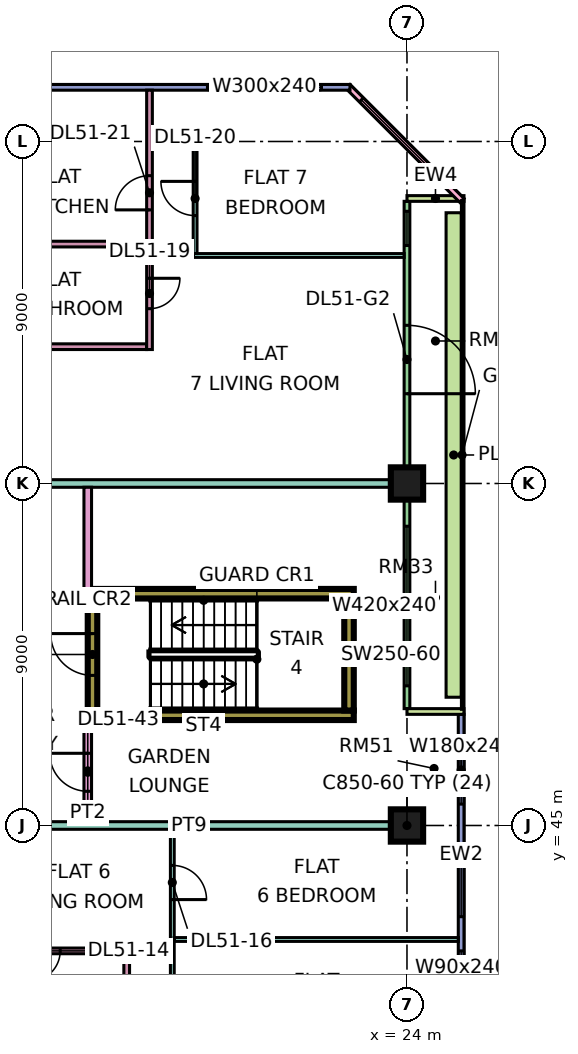
"""IFC4 building model, lengths in metres.
Left out: names, types, materials, properties, quantities, classifications, styles, units other than length and angle.
Written with IfcOpenShell. Run it as: python <this file> out.ifc"""

import sys

from ifc_helpers import new_model, si_unit, direction, frame, frame_2d, origin, origin_2d, place, context, subcontext, project, spatial, rectangle, extrude, element, fill, save


model = new_model("IFC4")
c1 = context("Model", 3, precision=1e-05, world=origin(), true_north=direction((0.0, 1.0)))
c2 = subcontext(c1, "Body", "Model", "MODEL_VIEW")
j1 = project(units=[si_unit("LENGTHUNIT", "METRE"), si_unit("PLANEANGLEUNIT", "RADIAN")], contexts=[c1])
p1 = place(None, origin())
s1 = spatial("IfcSite", under=j1, at=p1, CompositionType="ELEMENT")
p2 = place(p1, origin())
s2 = spatial("IfcBuilding", under=s1, at=p2, CompositionType="ELEMENT")
p3 = place(p2, frame((0.0, 0.0, 219.15)))
s3 = spatial("IfcBuildingStorey", under=s2, at=p3, CompositionType="ELEMENT", Elevation=219.15)
for number, where, z_axis, x_axis in (
    (1, (24.0, 45.0, 0.0), (0.0, 0.0, 1.0), (1.0, 0.0, 0.0)),
    (2, (24.0, 54.0, 0.0), (0.0, 0.0, 1.0), (1.0, 0.0, 0.0)),
):
    element("IfcColumn", number, at=place(p3, frame(where, z_axis=z_axis, x_axis=x_axis)), inside=s3, PredefinedType="COLUMN", context=c2, shape_type="SweptSolid", body=[
        extrude(rectangle(XDim=0.85, YDim=0.85, at=origin_2d()), origin(), (0.0, 0.0, 1.0), 3.75),
    ])
for number, where, z_axis, x_axis in (
    (3, (15.6, 47.9, 0.0), (0.0, 0.0, 1.0), (1.0, 0.0, 0.0)),
    (4, (15.6, 51.1, 0.0), (0.0, 0.0, 1.0), (1.0, 0.0, 0.0)),
):
    element("IfcWall", number, at=place(p3, frame(where, z_axis=z_axis, x_axis=x_axis)), inside=s3, PredefinedType="SHEAR", context=c2, shape_type="SweptSolid", body=[
        extrude(rectangle(XDim=7.0, YDim=0.25, at=frame_2d((3.5, 0.0))), origin(), (0.0, 0.0, 1.0), 3.75),
    ])
p4 = place(p3, frame((15.725, 48.025, 0.0), z_axis=(0.0, 0.0, 1.0), x_axis=(0.0, 1.0, 0.0)))
e5 = element("IfcWall", 5, at=p4, inside=s3, PredefinedType="SHEAR", context=c2, shape_type="SweptSolid", body=[
    extrude(rectangle(XDim=2.95, YDim=0.25, at=frame_2d((1.475, 0.0))), origin(), (0.0, 0.0, 1.0), 3.75),
])
p5 = place(p4, frame((0.925, 0.0, 0.0)))
e6 = element("IfcOpeningElement", 6, at=p5, cuts=e5, PredefinedType="OPENING", context=c2, shape_type="SweptSolid", body=[
    extrude(rectangle(XDim=1.1, YDim=2.2, at=frame_2d((0.55, 1.1))), frame((0.0, 0.135, 0.0), z_axis=(0.0, -1.0, 0.0), x_axis=(1.0, 0.0, 0.0)), (0.0, 0.0, 1.0), 0.27),
])
p6 = place(p3, frame((22.475, 48.025, 0.0), z_axis=(0.0, 0.0, 1.0), x_axis=(0.0, 1.0, 0.0)))
e7 = element("IfcWall", 7, at=p6, inside=s3, PredefinedType="SHEAR", context=c2, shape_type="SweptSolid", body=[
    extrude(rectangle(XDim=2.95, YDim=0.25, at=frame_2d((1.475, 0.0))), origin(), (0.0, 0.0, 1.0), 3.75),
])
p7 = place(p3, frame((25.425, 40.5, 0.0), z_axis=(0.0, 0.0, 1.0), x_axis=(0.0, 1.0, 0.0)))
e8 = element("IfcWall", 8, at=p7, inside=s3, PredefinedType="SOLIDWALL", context=c2, shape_type="SweptSolid", body=[
    extrude(rectangle(XDim=7.425, YDim=0.15, at=frame_2d((3.712, 0.0))), origin(), (0.0, 0.0, 1.0), 3.35),
])
p8 = place(p7, frame((0.3, 0.0, 0.45)))
e9 = element("IfcOpeningElement", 9, at=p8, cuts=e8, PredefinedType="OPENING", context=c2, shape_type="SweptSolid", body=[
    extrude(rectangle(XDim=0.9, YDim=2.4, at=frame_2d((0.45, 1.2))), frame((0.0, 0.085, 0.0), z_axis=(0.0, -1.0, 0.0), x_axis=(1.0, 0.0, 0.0)), (0.0, 0.0, 1.0), 0.17),
])
p9 = place(p7, frame((2.1, 0.0, 0.45)))
e10 = element("IfcOpeningElement", 10, at=p9, cuts=e8, PredefinedType="OPENING", context=c2, shape_type="SweptSolid", body=[
    extrude(rectangle(XDim=1.8, YDim=2.4, at=frame_2d((0.9, 1.2))), frame((0.0, 0.085, 0.0), z_axis=(0.0, -1.0, 0.0), x_axis=(1.0, 0.0, 0.0)), (0.0, 0.0, 1.0), 0.17),
])
p10 = place(p7, frame((5.062, 0.0, 0.45)))
e11 = element("IfcOpeningElement", 11, at=p10, cuts=e8, PredefinedType="OPENING", context=c2, shape_type="SweptSolid", body=[
    extrude(rectangle(XDim=1.8, YDim=2.4, at=frame_2d((0.9, 1.2))), frame((0.0, 0.085, 0.0), z_axis=(0.0, -1.0, 0.0), x_axis=(1.0, 0.0, 0.0)), (0.0, 0.0, 1.0), 0.17),
])
p11 = place(p3, frame((24.0, 48.075, 0.0), z_axis=(0.0, 0.0, 1.0), x_axis=(0.0, 1.0, 0.0)))
e12 = element("IfcWall", 12, at=p11, inside=s3, PredefinedType="SOLIDWALL", context=c2, shape_type="SweptSolid", body=[
    extrude(rectangle(XDim=13.35, YDim=0.15, at=frame_2d((6.675, 0.0))), origin(), (0.0, 0.0, 1.0), 3.35),
])
p12 = place(p11, frame((0.6, 0.0, 0.45)))
e13 = element("IfcOpeningElement", 13, at=p12, cuts=e12, PredefinedType="OPENING", context=c2, shape_type="SweptSolid", body=[
    extrude(rectangle(XDim=4.2, YDim=2.4, at=frame_2d((2.1, 1.2))), frame((0.0, 0.085, 0.0), z_axis=(0.0, -1.0, 0.0), x_axis=(1.0, 0.0, 0.0)), (0.0, 0.0, 1.0), 0.17),
])
p13 = place(p11, frame((8.288, 0.0, 0.0)))
e14 = element("IfcOpeningElement", 14, at=p13, cuts=e12, PredefinedType="OPENING", context=c2, shape_type="SweptSolid", body=[
    extrude(rectangle(XDim=1.8, YDim=2.4, at=frame_2d((0.9, 1.2))), frame((0.0, 0.085, 0.0), z_axis=(0.0, -1.0, 0.0), x_axis=(1.0, 0.0, 0.0)), (0.0, 0.0, 1.0), 0.17),
])
p14 = place(p11, frame((12.188, 0.0, 0.45)))
e15 = element("IfcOpeningElement", 15, at=p14, cuts=e12, PredefinedType="OPENING", context=c2, shape_type="SweptSolid", body=[
    extrude(rectangle(XDim=0.9, YDim=2.4, at=frame_2d((0.45, 1.2))), frame((0.0, 0.085, 0.0), z_axis=(0.0, -1.0, 0.0), x_axis=(1.0, 0.0, 0.0)), (0.0, 0.0, 1.0), 0.17),
])
for number, where, z_axis, x_axis in (
    (16, (25.5, 48.0, 0.0), (0.0, 0.0, 1.0), (-1.0, 0.0, 0.0)),
    (17, (25.5, 61.5, 0.0), (0.0, 0.0, 1.0), (-1.0, 0.0, 0.0)),
):
    element("IfcWall", number, at=place(p3, frame(where, z_axis=z_axis, x_axis=x_axis)), inside=s3, PredefinedType="SOLIDWALL", context=c2, shape_type="SweptSolid", body=[
        extrude(rectangle(XDim=1.5, YDim=0.15, at=frame_2d((0.75, 0.0))), origin(), (0.0, 0.0, 1.0), 3.35),
    ])
p15 = place(p3, frame((25.447, 61.447, 0.0), z_axis=(0.0, 0.0, 1.0), x_axis=(-0.707106781187, 0.707106781187, 0.0)))
e18 = element("IfcWall", 18, at=p15, inside=s3, PredefinedType="SOLIDWALL", context=c2, shape_type="SweptSolid", body=[
    extrude(rectangle(XDim=4.243, YDim=0.15, at=frame_2d((2.121, 0.0))), origin(), (0.0, 0.0, 1.0), 3.35),
])
p16 = place(p15, frame((0.744, 0.0, 0.45)))
e19 = element("IfcOpeningElement", 19, at=p16, cuts=e18, PredefinedType="OPENING", context=c2, shape_type="SweptSolid", body=[
    extrude(rectangle(XDim=3.0, YDim=2.4, at=frame_2d((1.5, 1.2))), frame((0.0, 0.085, 0.0), z_axis=(0.0, -1.0, 0.0), x_axis=(1.0, 0.0, 0.0)), (0.0, 0.0, 1.0), 0.17),
])
p17 = place(p3, frame((22.5, 64.425, 0.0), z_axis=(0.0, 0.0, 1.0), x_axis=(-1.0, 0.0, 0.0)))
e20 = element("IfcWall", 20, at=p17, inside=s3, PredefinedType="SOLIDWALL", context=c2, shape_type="SweptSolid", body=[
    extrude(rectangle(XDim=10.425, YDim=0.15, at=frame_2d((5.212, 0.0))), origin(), (0.0, 0.0, 1.0), 3.35),
])
p18 = place(p17, frame((0.75, 0.0, 0.45)))
e21 = element("IfcOpeningElement", 21, at=p18, cuts=e20, PredefinedType="OPENING", context=c2, shape_type="SweptSolid", body=[
    extrude(rectangle(XDim=3.0, YDim=2.4, at=frame_2d((1.5, 1.2))), frame((0.0, 0.085, 0.0), z_axis=(0.0, -1.0, 0.0), x_axis=(1.0, 0.0, 0.0)), (0.0, 0.0, 1.0), 0.17),
])
p19 = place(p3, frame((25.229, 48.375, 0.0), z_axis=(0.0, 0.0, 1.0), x_axis=(0.0, 1.0, 0.0)))
e22 = element("IfcWall", 22, at=p19, inside=s3, PredefinedType="SOLIDWALL", context=c2, shape_type="SweptSolid", body=[
    extrude(rectangle(XDim=12.75, YDim=0.4, at=frame_2d((6.375, 0.0))), origin(), (0.0, 0.0, 1.0), 0.7),
])
p20 = place(p3, frame((12.525, 41.7, 0.0), z_axis=(0.0, 0.0, 1.0), x_axis=(1.0, 0.0, 0.0)))
e23 = element("IfcWall", 23, at=p20, inside=s3, PredefinedType="PARTITIONING", context=c2, shape_type="SweptSolid", body=[
    extrude(rectangle(XDim=4.025, YDim=0.15, at=frame_2d((2.013, 0.0))), origin(), (0.0, 0.0, 1.0), 3.35),
])
p21 = place(p20, frame((1.55, 0.0, 0.0)))
e24 = element("IfcOpeningElement", 24, at=p21, cuts=e23, PredefinedType="OPENING", context=c2, shape_type="SweptSolid", body=[
    extrude(rectangle(XDim=0.8, YDim=2.1, at=frame_2d((0.4, 1.05))), frame((0.0, 0.085, 0.0), z_axis=(0.0, -1.0, 0.0), x_axis=(1.0, 0.0, 0.0)), (0.0, 0.0, 1.0), 0.17),
])
p22 = place(p3, frame((12.525, 45.0, 0.0), z_axis=(0.0, 0.0, 1.0), x_axis=(1.0, 0.0, 0.0)))
e25 = element("IfcWall", 25, at=p22, inside=s3, PredefinedType="PARTITIONING", context=c2, shape_type="SweptSolid", body=[
    extrude(rectangle(XDim=11.475, YDim=0.2, at=frame_2d((5.738, 0.0))), origin(), (0.0, 0.0, 1.0), 3.35),
])
p23 = place(p3, frame((12.525, 54.0, 0.0), z_axis=(0.0, 0.0, 1.0), x_axis=(1.0, 0.0, 0.0)))
e26 = element("IfcWall", 26, at=p23, inside=s3, PredefinedType="PARTITIONING", context=c2, shape_type="SweptSolid", body=[
    extrude(rectangle(XDim=11.401, YDim=0.2, at=frame_2d((5.701, 0.0))), origin(), (0.0, 0.0, 1.0), 3.35),
])
for number, where, z_axis, x_axis in (
    (27, (12.525, 57.6, 0.0), (0.0, 0.0, 1.0), (1.0, 0.0, 0.0)),
    (28, (12.525, 60.3, 0.0), (0.0, 0.0, 1.0), (1.0, 0.0, 0.0)),
):
    element("IfcWall", number, at=place(p3, frame(where, z_axis=z_axis, x_axis=x_axis)), inside=s3, PredefinedType="PARTITIONING", context=c2, shape_type="SweptSolid", body=[
        extrude(rectangle(XDim=4.625, YDim=0.15, at=frame_2d((2.312, 0.0))), origin(), (0.0, 0.0, 1.0), 3.35),
    ])
p24 = place(p3, frame((15.6, 45.1, 0.0), z_axis=(0.0, 0.0, 1.0), x_axis=(0.0, 1.0, 0.0)))
e29 = element("IfcWall", 29, at=p24, inside=s3, PredefinedType="PARTITIONING", context=c2, shape_type="SweptSolid", body=[
    extrude(rectangle(XDim=2.675, YDim=0.2, at=frame_2d((1.337, 0.0))), origin(), (0.0, 0.0, 1.0), 3.35),
])
p25 = place(p24, frame((0.8, 0.0, 0.0)))
e30 = element("IfcOpeningElement", 30, at=p25, cuts=e29, PredefinedType="OPENING", context=c2, shape_type="SweptSolid", body=[
    extrude(rectangle(XDim=1.0, YDim=2.1, at=frame_2d((0.5, 1.05))), frame((0.0, 0.11, 0.0), z_axis=(0.0, -1.0, 0.0), x_axis=(1.0, 0.0, 0.0)), (0.0, 0.0, 1.0), 0.22),
])
p26 = place(p3, frame((15.6, 51.225, 0.0), z_axis=(0.0, 0.0, 1.0), x_axis=(0.0, 1.0, 0.0)))
e31 = element("IfcWall", 31, at=p26, inside=s3, PredefinedType="PARTITIONING", context=c2, shape_type="SweptSolid", body=[
    extrude(rectangle(XDim=2.675, YDim=0.2, at=frame_2d((1.337, 0.0))), origin(), (0.0, 0.0, 1.0), 3.35),
])
p27 = place(p3, frame((16.625, 36.1, 0.0), z_axis=(0.0, 0.0, 1.0), x_axis=(0.0, 1.0, 0.0)))
e32 = element("IfcWall", 32, at=p27, inside=s3, PredefinedType="PARTITIONING", context=c2, shape_type="SweptSolid", body=[
    extrude(rectangle(XDim=5.675, YDim=0.15, at=frame_2d((2.837, 0.0))), origin(), (0.0, 0.0, 1.0), 3.35),
])
p28 = place(p27, frame((0.8, 0.0, 0.0)))
e33 = element("IfcOpeningElement", 33, at=p28, cuts=e32, PredefinedType="OPENING", context=c2, shape_type="SweptSolid", body=[
    extrude(rectangle(XDim=0.9, YDim=2.1, at=frame_2d((0.45, 1.05))), frame((0.0, 0.085, 0.0), z_axis=(0.0, -1.0, 0.0), x_axis=(1.0, 0.0, 0.0)), (0.0, 0.0, 1.0), 0.17),
])
p29 = place(p3, frame((17.225, 57.525, 0.0), z_axis=(0.0, 0.0, 1.0), x_axis=(0.0, 1.0, 0.0)))
e34 = element("IfcWall", 34, at=p29, inside=s3, PredefinedType="PARTITIONING", context=c2, shape_type="SweptSolid", body=[
    extrude(rectangle(XDim=6.825, YDim=0.15, at=frame_2d((3.413, 0.0))), origin(), (0.0, 0.0, 1.0), 3.35),
])
p30 = place(p29, frame((1.075, 0.0, 0.0)))
e35 = element("IfcOpeningElement", 35, at=p30, cuts=e34, PredefinedType="OPENING", context=c2, shape_type="SweptSolid", body=[
    extrude(rectangle(XDim=0.8, YDim=2.1, at=frame_2d((0.4, 1.05))), frame((0.0, 0.085, 0.0), z_axis=(0.0, -1.0, 0.0), x_axis=(1.0, 0.0, 0.0)), (0.0, 0.0, 1.0), 0.17),
])
p31 = place(p29, frame((3.675, 0.0, 0.0)))
e36 = element("IfcOpeningElement", 36, at=p31, cuts=e34, PredefinedType="OPENING", context=c2, shape_type="SweptSolid", body=[
    extrude(rectangle(XDim=0.9, YDim=2.1, at=frame_2d((0.45, 1.05))), frame((0.0, 0.085, 0.0), z_axis=(0.0, -1.0, 0.0), x_axis=(1.0, 0.0, 0.0)), (0.0, 0.0, 1.0), 0.17),
])
p32 = place(p3, frame((17.825, 39.05, 0.0), z_axis=(0.0, 0.0, 1.0), x_axis=(0.0, 1.0, 0.0)))
e37 = element("IfcWall", 37, at=p32, inside=s3, PredefinedType="PARTITIONING", context=c2, shape_type="SweptSolid", body=[
    extrude(rectangle(XDim=5.85, YDim=0.1, at=frame_2d((2.925, 0.0))), origin(), (0.0, 0.0, 1.0), 3.35),
])
p33 = place(p32, frame((1.0, 0.0, 0.0)))
e38 = element("IfcOpeningElement", 38, at=p33, cuts=e37, PredefinedType="OPENING", context=c2, shape_type="SweptSolid", body=[
    extrude(rectangle(XDim=0.9, YDim=2.1, at=frame_2d((0.45, 1.05))), frame((0.0, 0.06, 0.0), z_axis=(0.0, -1.0, 0.0), x_axis=(1.0, 0.0, 0.0)), (0.0, 0.0, 1.0), 0.12),
])
p34 = place(p32, frame((4.0, 0.0, 0.0)))
e39 = element("IfcOpeningElement", 39, at=p34, cuts=e37, PredefinedType="OPENING", context=c2, shape_type="SweptSolid", body=[
    extrude(rectangle(XDim=0.9, YDim=2.1, at=frame_2d((0.45, 1.05))), frame((0.0, 0.06, 0.0), z_axis=(0.0, -1.0, 0.0), x_axis=(1.0, 0.0, 0.0)), (0.0, 0.0, 1.0), 0.12),
])
p35 = place(p3, frame((17.875, 42.0, 0.0), z_axis=(0.0, 0.0, 1.0), x_axis=(1.0, 0.0, 0.0)))
e40 = element("IfcWall", 40, at=p35, inside=s3, PredefinedType="PARTITIONING", context=c2, shape_type="SweptSolid", body=[
    extrude(rectangle(XDim=7.476, YDim=0.1, at=frame_2d((3.738, 0.0))), origin(), (0.0, 0.0, 1.0), 3.35),
])
p36 = place(p3, frame((18.0, 63.0, 0.0), z_axis=(0.0, 0.0, 1.0), x_axis=(1.0, 0.0, 0.0)))
e41 = element("IfcWall", 41, at=p36, inside=s3, PredefinedType="PARTITIONING", context=c2, shape_type="SweptSolid", body=[
    extrude(rectangle(XDim=0.375, YDim=0.1, at=frame_2d((0.188, 0.0))), origin(), (0.0, 0.0, 1.0), 3.35),
])
p37 = place(p3, frame((18.375, 60.0, 0.0), z_axis=(0.0, 0.0, 1.0), x_axis=(1.0, 0.0, 0.0)))
e42 = element("IfcWall", 42, at=p37, inside=s3, PredefinedType="PARTITIONING", context=c2, shape_type="SweptSolid", body=[
    extrude(rectangle(XDim=5.551, YDim=0.1, at=frame_2d((2.775, 0.0))), origin(), (0.0, 0.0, 1.0), 3.35),
])
p38 = place(p3, frame((18.425, 60.05, 0.0), z_axis=(0.0, 0.0, 1.0), x_axis=(0.0, 1.0, 0.0)))
e43 = element("IfcWall", 43, at=p38, inside=s3, PredefinedType="PARTITIONING", context=c2, shape_type="SweptSolid", body=[
    extrude(rectangle(XDim=3.0, YDim=0.1, at=frame_2d((1.5, 0.0))), origin(), (0.0, 0.0, 1.0), 3.35),
])
p39 = place(p38, frame((1.0, 0.0, 0.0)))
e44 = element("IfcOpeningElement", 44, at=p39, cuts=e43, PredefinedType="OPENING", context=c2, shape_type="SweptSolid", body=[
    extrude(rectangle(XDim=0.9, YDim=2.1, at=frame_2d((0.45, 1.05))), frame((0.0, 0.06, 0.0), z_axis=(0.0, -1.0, 0.0), x_axis=(1.0, 0.0, 0.0)), (0.0, 0.0, 1.0), 0.12),
])
p40 = place(p8, origin())
e45 = element("IfcWindow", 45, at=p40, inside=s3, PartitioningType="SINGLE_PANEL", PredefinedType="WINDOW", context=c2, shape_type="SweptSolid", body=[
    extrude(rectangle(XDim=0.9, YDim=2.4, at=frame_2d((0.45, 1.2))), frame((0.0, 0.03, 0.0), z_axis=(0.0, -1.0, 0.0), x_axis=(1.0, 0.0, 0.0)), (0.0, 0.0, 1.0), 0.06),
])
fill(e9, e45)
p41 = place(p9, origin())
e46 = element("IfcWindow", 46, at=p41, inside=s3, PartitioningType="SINGLE_PANEL", PredefinedType="WINDOW", context=c2, shape_type="SweptSolid", body=[
    extrude(rectangle(XDim=1.8, YDim=2.4, at=frame_2d((0.9, 1.2))), frame((0.0, 0.03, 0.0), z_axis=(0.0, -1.0, 0.0), x_axis=(1.0, 0.0, 0.0)), (0.0, 0.0, 1.0), 0.06),
])
fill(e10, e46)
p42 = place(p10, origin())
e47 = element("IfcWindow", 47, at=p42, inside=s3, PartitioningType="SINGLE_PANEL", PredefinedType="WINDOW", context=c2, shape_type="SweptSolid", body=[
    extrude(rectangle(XDim=1.8, YDim=2.4, at=frame_2d((0.9, 1.2))), frame((0.0, 0.03, 0.0), z_axis=(0.0, -1.0, 0.0), x_axis=(1.0, 0.0, 0.0)), (0.0, 0.0, 1.0), 0.06),
])
fill(e11, e47)
p43 = place(p12, origin())
e48 = element("IfcWindow", 48, at=p43, inside=s3, PartitioningType="SINGLE_PANEL", PredefinedType="WINDOW", context=c2, shape_type="SweptSolid", body=[
    extrude(rectangle(XDim=4.2, YDim=2.4, at=frame_2d((2.1, 1.2))), frame((0.0, 0.03, 0.0), z_axis=(0.0, -1.0, 0.0), x_axis=(1.0, 0.0, 0.0)), (0.0, 0.0, 1.0), 0.06),
])
fill(e13, e48)
p44 = place(p13, frame((1.8, 0.0, 0.0), z_axis=(0.0, 0.0, 1.0), x_axis=(-1.0, 0.0, 0.0)))
e49 = element("IfcDoor", 49, at=p44, inside=s3, OperationType="DOUBLE_DOOR_SINGLE_SWING", PredefinedType="DOOR", context=c2, shape_type="SweptSolid", body=[
    extrude(rectangle(XDim=1.8, YDim=2.4, at=frame_2d((0.9, 1.2))), frame((0.0, 0.025, 0.0), z_axis=(0.0, -1.0, 0.0), x_axis=(1.0, 0.0, 0.0)), (0.0, 0.0, 1.0), 0.05),
])
fill(e14, e49)
p45 = place(p14, origin())
e50 = element("IfcWindow", 50, at=p45, inside=s3, PartitioningType="SINGLE_PANEL", PredefinedType="WINDOW", context=c2, shape_type="SweptSolid", body=[
    extrude(rectangle(XDim=0.9, YDim=2.4, at=frame_2d((0.45, 1.2))), frame((0.0, 0.03, 0.0), z_axis=(0.0, -1.0, 0.0), x_axis=(1.0, 0.0, 0.0)), (0.0, 0.0, 1.0), 0.06),
])
fill(e15, e50)
p46 = place(p16, origin())
e51 = element("IfcWindow", 51, at=p46, inside=s3, PartitioningType="SINGLE_PANEL", PredefinedType="WINDOW", context=c2, shape_type="SweptSolid", body=[
    extrude(rectangle(XDim=3.0, YDim=2.4, at=frame_2d((1.5, 1.2))), frame((0.0, 0.03, 0.0), z_axis=(0.0, -1.0, 0.0), x_axis=(1.0, 0.0, 0.0)), (0.0, 0.0, 1.0), 0.06),
])
fill(e19, e51)
p47 = place(p18, origin())
e52 = element("IfcWindow", 52, at=p47, inside=s3, PartitioningType="SINGLE_PANEL", PredefinedType="WINDOW", context=c2, shape_type="SweptSolid", body=[
    extrude(rectangle(XDim=3.0, YDim=2.4, at=frame_2d((1.5, 1.2))), frame((0.0, 0.03, 0.0), z_axis=(0.0, -1.0, 0.0), x_axis=(1.0, 0.0, 0.0)), (0.0, 0.0, 1.0), 0.06),
])
fill(e21, e52)
p48 = place(p5, frame((1.1, 0.0, 0.0), z_axis=(0.0, 0.0, 1.0), x_axis=(-1.0, 0.0, 0.0)))
e53 = element("IfcDoor", 53, at=p48, inside=s3, OperationType="SINGLE_SWING_RIGHT", PredefinedType="DOOR", context=c2, shape_type="SweptSolid", body=[
    extrude(rectangle(XDim=1.1, YDim=2.2, at=frame_2d((0.55, 1.1))), frame((0.0, 0.025, 0.0), z_axis=(0.0, -1.0, 0.0), x_axis=(1.0, 0.0, 0.0)), (0.0, 0.0, 1.0), 0.05),
])
fill(e6, e53)
p49 = place(p21, frame((0.8, 0.0, 0.0), z_axis=(0.0, 0.0, 1.0), x_axis=(-1.0, 0.0, 0.0)))
e54 = element("IfcDoor", 54, at=p49, inside=s3, OperationType="SINGLE_SWING_LEFT", PredefinedType="DOOR", context=c2, shape_type="SweptSolid", body=[
    extrude(rectangle(XDim=0.8, YDim=2.1, at=frame_2d((0.4, 1.05))), frame((0.0, 0.025, 0.0), z_axis=(0.0, -1.0, 0.0), x_axis=(1.0, 0.0, 0.0)), (0.0, 0.0, 1.0), 0.05),
])
fill(e24, e54)
p50 = place(p34, frame((0.9, 0.0, 0.0), z_axis=(0.0, 0.0, 1.0), x_axis=(-1.0, 0.0, 0.0)))
e55 = element("IfcDoor", 55, at=p50, inside=s3, OperationType="SINGLE_SWING_LEFT", PredefinedType="DOOR", context=c2, shape_type="SweptSolid", body=[
    extrude(rectangle(XDim=0.9, YDim=2.1, at=frame_2d((0.45, 1.05))), frame((0.0, 0.025, 0.0), z_axis=(0.0, -1.0, 0.0), x_axis=(1.0, 0.0, 0.0)), (0.0, 0.0, 1.0), 0.05),
])
fill(e39, e55)
p51 = place(p30, origin())
e56 = element("IfcDoor", 56, at=p51, inside=s3, OperationType="SINGLE_SWING_RIGHT", PredefinedType="DOOR", context=c2, shape_type="SweptSolid", body=[
    extrude(rectangle(XDim=0.8, YDim=2.1, at=frame_2d((0.4, 1.05))), frame((0.0, 0.025, 0.0), z_axis=(0.0, -1.0, 0.0), x_axis=(1.0, 0.0, 0.0)), (0.0, 0.0, 1.0), 0.05),
])
fill(e35, e56)
p52 = place(p39, frame((0.9, 0.0, 0.0), z_axis=(0.0, 0.0, 1.0), x_axis=(-1.0, 0.0, 0.0)))
e57 = element("IfcDoor", 57, at=p52, inside=s3, OperationType="SINGLE_SWING_RIGHT", PredefinedType="DOOR", context=c2, shape_type="SweptSolid", body=[
    extrude(rectangle(XDim=0.9, YDim=2.1, at=frame_2d((0.45, 1.05))), frame((0.0, 0.025, 0.0), z_axis=(0.0, -1.0, 0.0), x_axis=(1.0, 0.0, 0.0)), (0.0, 0.0, 1.0), 0.05),
])
fill(e44, e57)
p53 = place(p31, origin())
e58 = element("IfcDoor", 58, at=p53, inside=s3, OperationType="SINGLE_SWING_LEFT", PredefinedType="DOOR", context=c2, shape_type="SweptSolid", body=[
    extrude(rectangle(XDim=0.9, YDim=2.1, at=frame_2d((0.45, 1.05))), frame((0.0, 0.025, 0.0), z_axis=(0.0, -1.0, 0.0), x_axis=(1.0, 0.0, 0.0)), (0.0, 0.0, 1.0), 0.05),
])
fill(e36, e58)
p54 = place(p25, frame((1.0, 0.0, 0.0), z_axis=(0.0, 0.0, 1.0), x_axis=(-1.0, 0.0, 0.0)))
e59 = element("IfcDoor", 59, at=p54, inside=s3, OperationType="SINGLE_SWING_RIGHT", PredefinedType="DOOR", context=c2, shape_type="SweptSolid", body=[
    extrude(rectangle(XDim=1.0, YDim=2.1, at=frame_2d((0.5, 1.05))), frame((0.0, 0.025, 0.0), z_axis=(0.0, -1.0, 0.0), x_axis=(1.0, 0.0, 0.0)), (0.0, 0.0, 1.0), 0.05),
])
fill(e30, e59)
save(model, sys.argv[1])
